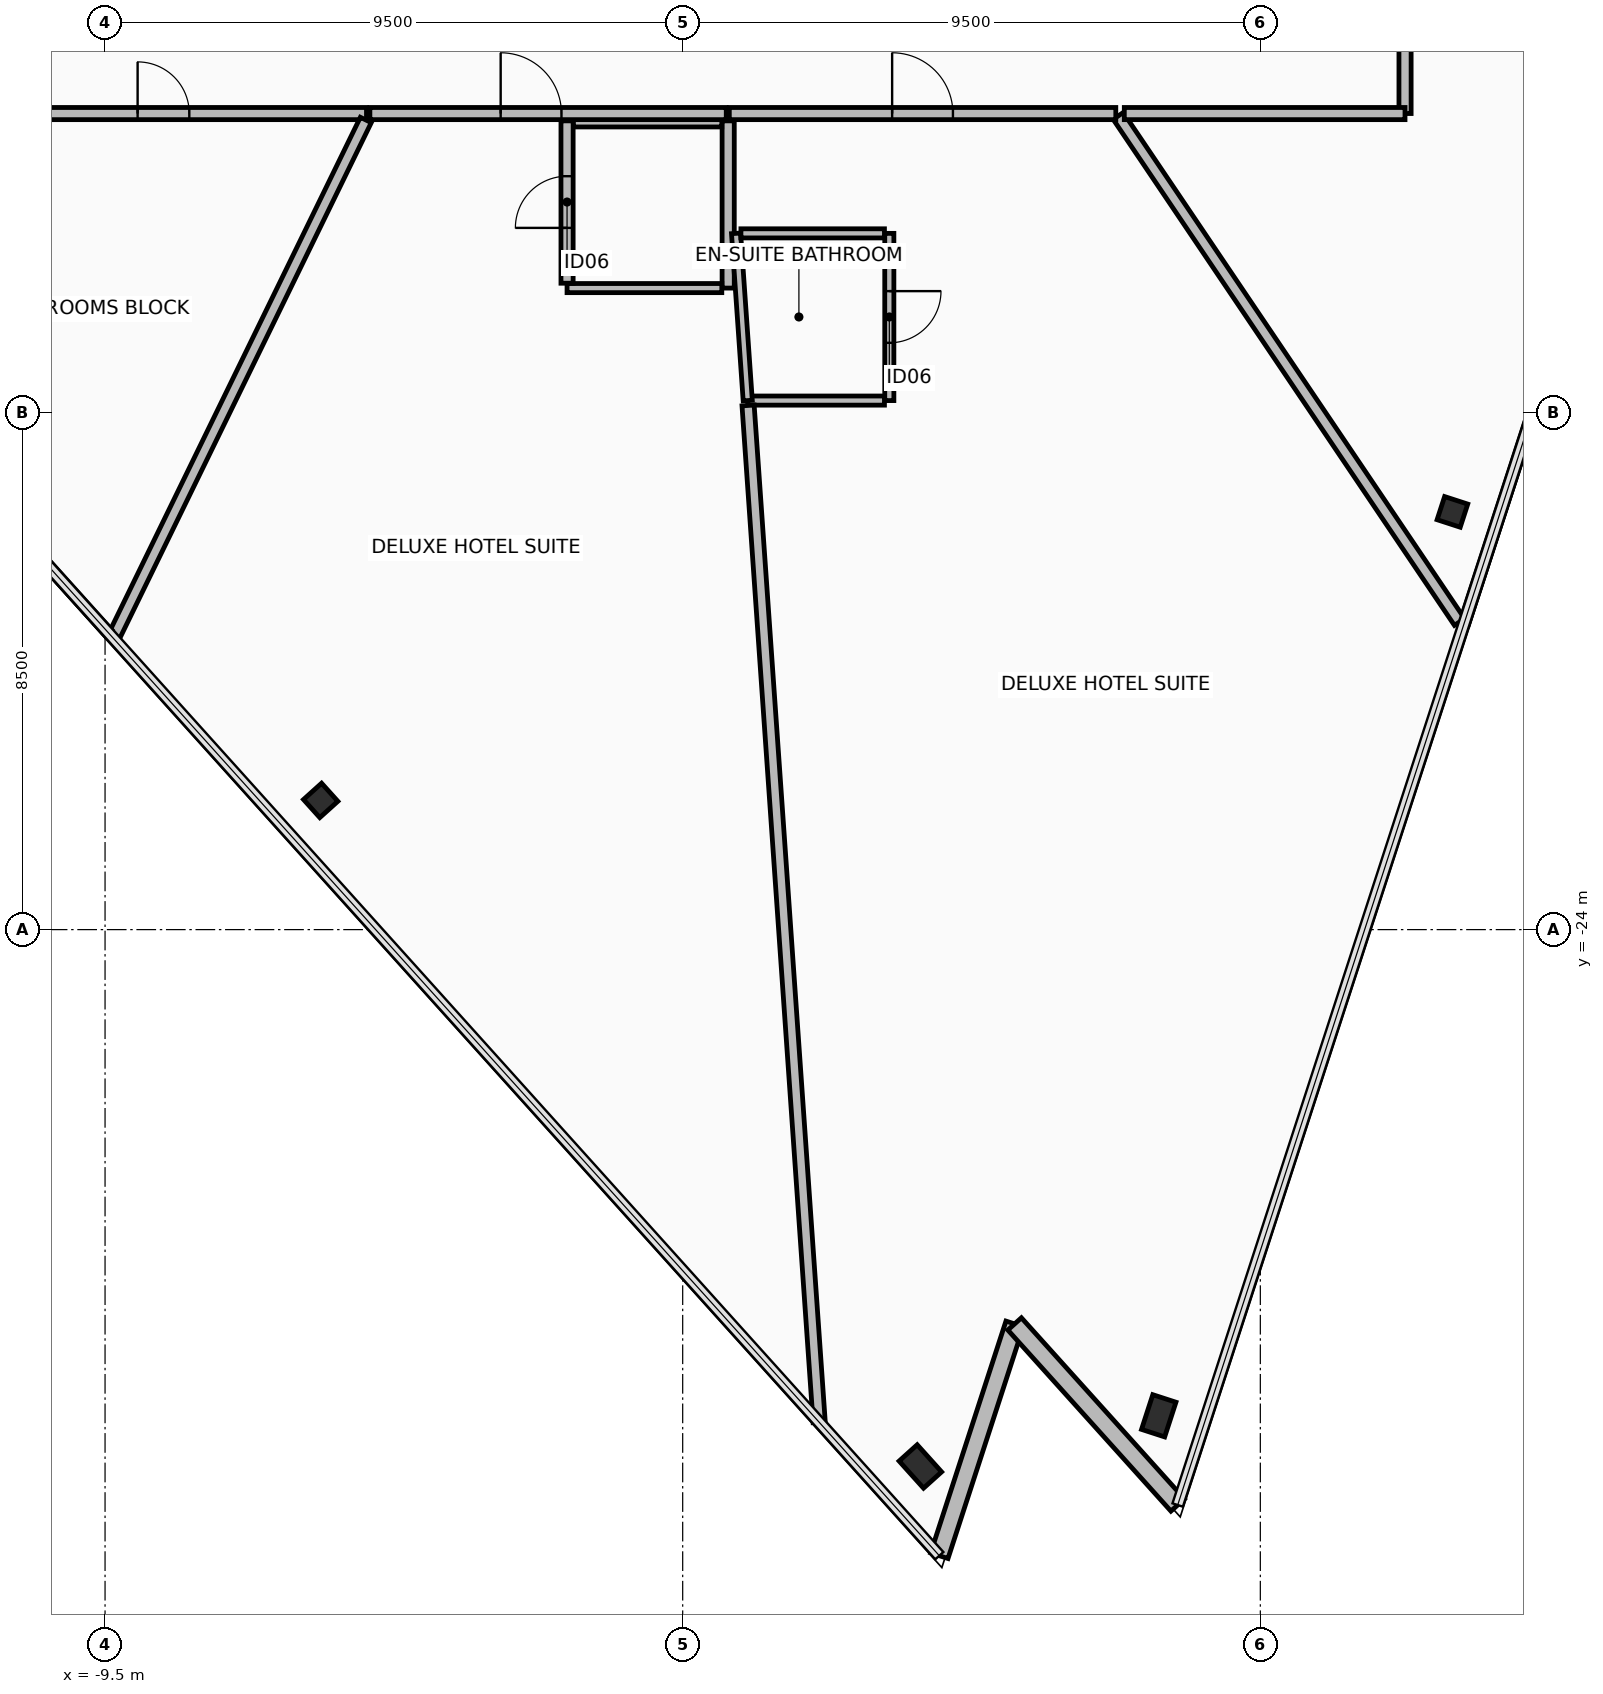
"""IFC4 building model, lengths in metres.
Left out: names, types, materials, properties, quantities, classifications, styles, units other than length and angle.
Written with IfcOpenShell. Run it as: python <this file> out.ifc"""

import sys

from ifc_helpers import new_model, si_unit, direction, frame, frame_2d, origin, origin_2d, place, context, subcontext, project, spatial, rectangle, hollow_rectangle, extrude, element, fill, save


model = new_model("IFC4")
c1 = context("Model", 3, precision=1e-05, world=origin(), true_north=direction((0.0, 1.0)))
c2 = subcontext(c1, "Body", "Model", "MODEL_VIEW")
j1 = project(units=[si_unit("LENGTHUNIT", "METRE"), si_unit("PLANEANGLEUNIT", "RADIAN")], contexts=[c1])
p1 = place(None, origin())
s1 = spatial("IfcSite", under=j1, at=p1, CompositionType="ELEMENT")
p2 = place(p1, origin())
s2 = spatial("IfcBuilding", under=s1, at=p2, CompositionType="ELEMENT")
p3 = place(p2, frame((0.0, 0.0, 279.75)))
s3 = spatial("IfcBuildingStorey", under=s2, at=p3, CompositionType="ELEMENT", Elevation=279.75)
p4 = place(p3, frame((-5.954, -21.875, 0.0), z_axis=(0.0, 0.0, 1.0), x_axis=(-0.669130606359, 0.743144825477, 0.0)))
e1 = element("IfcColumn", 1, at=p4, inside=s3, PredefinedType="COLUMN", context=c2, shape_type="SweptSolid", body=[
    extrude(hollow_rectangle(XDim=0.4, YDim=0.4, WallThickness=0.025, at=origin_2d()), origin(), (0.0, 0.0, 1.0), 3.65),
])
for number, where, z_axis, x_axis in (
    (2, (3.909, -32.829, 0.0), (0.0, 0.0, 1.0), (-0.669, 0.743, 0.0)),
    (3, (7.829, -31.996, 0.0), (0.0, 0.0, 1.0), (0.309, 0.951, 0.0)),
):
    element("IfcColumn", number, at=place(p3, frame(where, z_axis=z_axis, x_axis=x_axis)), inside=s3, PredefinedType="COLUMN", context=c2, shape_type="SweptSolid", body=[
        extrude(hollow_rectangle(XDim=0.4, YDim=0.6, WallThickness=0.03, at=origin_2d()), origin(), (0.0, 0.0, 1.0), 3.65),
    ])
p5 = place(p3, frame((12.659, -17.131, -0.19), z_axis=(0.0, 0.0, 1.0), x_axis=(0.309018654281, 0.951055976957, 0.0)))
e4 = element("IfcColumn", 4, at=p5, inside=s3, PredefinedType="COLUMN", context=c2, shape_type="SweptSolid", body=[
    extrude(hollow_rectangle(XDim=0.4, YDim=0.4, WallThickness=0.025, at=origin_2d()), origin(), (0.0, 0.0, 1.0), 3.84),
])
p6 = place(p3, frame((4.221, -34.296, 0.0), z_axis=(0.0, 0.0, 1.0), x_axis=(0.309018580232, 0.951056001018, 0.0)))
e5 = element("IfcWall", 5, at=p6, inside=s3, PredefinedType="STANDARD", context=c2, shape_type="SweptSolid", body=[
    extrude(rectangle(XDim=4.008, YDim=0.3, at=frame_2d((2.004, 0.0))), origin(), (0.0, 0.0, 1.0), 2.81),
])
p7 = place(p3, frame((5.459, -30.484, 0.0), z_axis=(0.0, 0.0, 1.0), x_axis=(0.669132983361, -0.743142685208, 0.0)))
e6 = element("IfcWall", 6, at=p7, inside=s3, PredefinedType="STANDARD", context=c2, shape_type="SweptSolid", body=[
    extrude(rectangle(XDim=4.008, YDim=0.3, at=frame_2d((2.004, 0.0))), origin(), (0.0, 0.0, 1.0), 2.81),
])
p8 = place(p3, frame((0.748, -10.7, 0.0), z_axis=(0.0, 0.0, 1.0), x_axis=(0.0, -1.0, 0.0)))
e7 = element("IfcWall", 7, at=p8, inside=s3, PredefinedType="PARTITIONING", context=c2, shape_type="SweptSolid", body=[
    extrude(rectangle(XDim=2.75, YDim=0.2, at=frame_2d((1.375, 0.0))), origin(), (0.0, 0.0, 1.0), 3.465),
])
p9 = place(p3, frame((0.643, -13.45, 0.0), z_axis=(0.0, 0.0, 1.0), x_axis=(-1.0, 0.0, 0.0)))
e8 = element("IfcWall", 8, at=p9, inside=s3, PredefinedType="PARTITIONING", context=c2, shape_type="SweptSolid", body=[
    extrude(rectangle(XDim=2.545, YDim=0.15, at=frame_2d((1.272, 0.0))), origin(), (0.0, 0.0, 1.0), 3.465),
])
p10 = place(p3, frame((-1.902, -13.37, 0.0), z_axis=(0.0, 0.0, 1.0), x_axis=(0.0, 1.0, 0.0)))
e9 = element("IfcWall", 9, at=p10, inside=s3, PredefinedType="PARTITIONING", context=c2, shape_type="SweptSolid", body=[
    extrude(rectangle(XDim=2.67, YDim=0.2, at=frame_2d((1.335, 0.0))), origin(), (0.0, 0.0, 1.0), 3.465),
])
p11 = place(p10, frame((0.91, 0.0, 0.0)))
e10 = element("IfcOpeningElement", 10, at=p11, cuts=e9, PredefinedType="OPENING", context=c2, shape_type="SweptSolid", body=[
    extrude(rectangle(XDim=0.85, YDim=2.1, at=frame_2d((0.425, 1.05))), frame((0.0, 0.11, 0.0), z_axis=(0.0, -1.0, 0.0), x_axis=(1.0, 0.0, 0.0)), (0.0, 0.0, 1.0), 0.22),
])
p12 = place(p3, frame((-1.797, -10.7, 0.0), z_axis=(0.0, 0.0, 1.0), x_axis=(1.0, 0.0, 0.0)))
e11 = element("IfcWall", 11, at=p12, inside=s3, PredefinedType="PARTITIONING", context=c2, shape_type="SweptSolid", body=[
    extrude(rectangle(XDim=2.44, YDim=0.2, at=frame_2d((1.22, 0.0))), origin(), (0.0, 0.0, 1.0), 3.465),
])
p13 = place(p3, frame((3.398, -12.55, 0.0), z_axis=(0.0, 0.0, 1.0), x_axis=(0.0, -1.0, 0.0)))
e12 = element("IfcWall", 12, at=p13, inside=s3, PredefinedType="PARTITIONING", context=c2, shape_type="SweptSolid", body=[
    extrude(rectangle(XDim=2.75, YDim=0.15, at=frame_2d((1.375, 0.0))), origin(), (0.0, 0.0, 1.0), 3.465),
])
p14 = place(p13, frame((0.95, 0.0, 0.0)))
e13 = element("IfcOpeningElement", 13, at=p14, cuts=e12, PredefinedType="OPENING", context=c2, shape_type="SweptSolid", body=[
    extrude(rectangle(XDim=0.85, YDim=2.1, at=frame_2d((0.425, 1.05))), frame((0.0, 0.085, 0.0), z_axis=(0.0, -1.0, 0.0), x_axis=(1.0, 0.0, 0.0)), (0.0, 0.0, 1.0), 0.17),
])
p15 = place(p3, frame((3.318, -15.3, 0.0), z_axis=(0.0, 0.0, 1.0), x_axis=(-1.0, 0.0, 0.0)))
e14 = element("IfcWall", 14, at=p15, inside=s3, PredefinedType="PARTITIONING", context=c2, shape_type="SweptSolid", body=[
    extrude(rectangle(XDim=2.248, YDim=0.15, at=frame_2d((1.124, 0.0))), origin(), (0.0, 0.0, 1.0), 3.465),
])
p16 = place(p3, frame((1.07, -15.3, 0.0), z_axis=(0.0, 0.0, 1.0), x_axis=(-0.069698693715, 0.997568088952, 0.0)))
e15 = element("IfcWall", 15, at=p16, inside=s3, PredefinedType="PARTITIONING", context=c2, shape_type="SweptSolid", body=[
    extrude(rectangle(XDim=2.757, YDim=0.15, at=frame_2d((1.378, 0.0))), origin(), (0.0, 0.0, 1.0), 3.465),
])
p17 = place(p3, frame((0.958, -12.55, 0.0), z_axis=(0.0, 0.0, 1.0), x_axis=(1.0, 0.0, 0.0)))
e16 = element("IfcWall", 16, at=p17, inside=s3, PredefinedType="PARTITIONING", context=c2, shape_type="SweptSolid", body=[
    extrude(rectangle(XDim=2.36, YDim=0.15, at=frame_2d((1.18, 0.0))), origin(), (0.0, 0.0, 1.0), 3.465),
])
p18 = place(p3, frame((-11.879, -10.58, 0.0), z_axis=(0.0, 0.0, 1.0), x_axis=(1.0, 0.0, 0.0)))
e17 = element("IfcWall", 17, at=p18, inside=s3, PredefinedType="PARTITIONING", context=c2, shape_type="SweptSolid", body=[
    extrude(rectangle(XDim=6.679, YDim=0.2, at=frame_2d((3.34, 0.0))), origin(), (0.0, 0.0, 1.0), 3.22),
])
p19 = place(p18, frame((2.915, 0.0, 0.0)))
e18 = element("IfcOpeningElement", 18, at=p19, cuts=e17, PredefinedType="OPENING", context=c2, shape_type="SweptSolid", body=[
    extrude(rectangle(XDim=0.85, YDim=2.1, at=frame_2d((0.425, 1.05))), frame((0.0, 0.11, 0.0), z_axis=(0.0, -1.0, 0.0), x_axis=(1.0, 0.0, 0.0)), (0.0, 0.0, 1.0), 0.22),
])
p20 = place(p3, frame((-5.211, -10.685, 0.0), z_axis=(0.0, 0.0, 1.0), x_axis=(-0.438373396373, -0.8987929491, 0.0)))
e19 = element("IfcWall", 19, at=p20, inside=s3, PredefinedType="PARTITIONING", context=c2, shape_type="SweptSolid", body=[
    extrude(rectangle(XDim=9.479, YDim=0.2, at=frame_2d((4.74, 0.0))), origin(), (0.0, 0.0, 1.0), 2.81),
])
p21 = place(p3, frame((-9.443, -19.121, 0.0), z_axis=(0.0, 0.0, 1.0), x_axis=(-0.669126879752, 0.743148180912, 0.0)))
e20 = element("IfcWall", 20, at=p21, inside=s3, PredefinedType="PARTITIONING", context=c2, shape_type="SweptSolid", body=[
    extrude(rectangle(XDim=10.647, YDim=0.15, at=frame_2d((5.323, 0.0))), origin(), (0.0, 0.0, 1.0), 3.465),
])
p22 = place(p3, frame((11.88, -10.579, 0.0), z_axis=(0.0, 0.0, 1.0), x_axis=(0.0, 1.0, 0.0)))
e21 = element("IfcWall", 21, at=p22, inside=s3, PredefinedType="PARTITIONING", context=c2, shape_type="SweptSolid", body=[
    extrude(rectangle(XDim=4.745, YDim=0.2, at=frame_2d((2.373, 0.0))), origin(), (0.0, 0.0, 1.0), 2.96),
])
p23 = place(p22, frame((1.948, 0.0, 0.0)))
e22 = element("IfcOpeningElement", 22, at=p23, cuts=e21, PredefinedType="OPENING", context=c2, shape_type="SweptSolid", body=[
    extrude(rectangle(XDim=0.85, YDim=2.1, at=frame_2d((0.425, 1.05))), frame((0.0, 0.11, 0.0), z_axis=(0.0, -1.0, 0.0), x_axis=(1.0, 0.0, 0.0)), (0.0, 0.0, 1.0), 0.22),
])
p24 = place(p3, frame((16.406, -8.026, 0.0), z_axis=(0.0, 0.0, 1.0), x_axis=(-0.309030454155, -0.951052142842, 0.0)))
e23 = element("IfcWall", 23, at=p24, inside=s3, PredefinedType="PARTITIONING", context=c2, shape_type="SweptSolid", body=[
    extrude(rectangle(XDim=11.514, YDim=0.15, at=frame_2d((5.757, 0.0))), origin(), (0.0, 0.0, 1.0), 3.465),
])
p25 = place(p3, frame((12.776, -18.941, 0.0), z_axis=(0.0, 0.0, 1.0), x_axis=(-0.559187933526, 0.829040924804, 0.0)))
e24 = element("IfcWall", 24, at=p25, inside=s3, PredefinedType="PARTITIONING", context=c2, shape_type="SweptSolid", body=[
    extrude(rectangle(XDim=10.038, YDim=0.2, at=frame_2d((5.019, 0.0))), origin(), (0.0, 0.0, 1.0), 2.81),
])
p26 = place(p3, frame((7.263, -10.58, 0.0), z_axis=(0.0, 0.0, 1.0), x_axis=(1.0, 0.0, 0.0)))
e25 = element("IfcWall", 25, at=p26, inside=s3, PredefinedType="PARTITIONING", context=c2, shape_type="SweptSolid", body=[
    extrude(rectangle(XDim=4.616, YDim=0.2, at=frame_2d((2.308, 0.0))), origin(), (0.0, 0.0, 1.0), 2.96),
])
p27 = place(p3, frame((-5.145, -10.58, 0.0), z_axis=(0.0, 0.0, 1.0), x_axis=(1.0, 0.0, 0.0)))
e26 = element("IfcWall", 26, at=p27, inside=s3, PredefinedType="PARTITIONING", context=c2, shape_type="SweptSolid", body=[
    extrude(rectangle(XDim=5.861, YDim=0.2, at=frame_2d((2.931, 0.0))), origin(), (0.0, 0.0, 1.0), 2.96),
])
p28 = place(p27, frame((2.151, 0.0, 0.0)))
e27 = element("IfcOpeningElement", 27, at=p28, cuts=e26, PredefinedType="OPENING", context=c2, shape_type="SweptSolid", body=[
    extrude(rectangle(XDim=1.0, YDim=2.15, at=frame_2d((0.5, 1.075))), frame((0.0, 0.11, 0.0), z_axis=(0.0, -1.0, 0.0), x_axis=(1.0, 0.0, 0.0)), (0.0, 0.0, 1.0), 0.22),
])
p29 = place(p3, frame((1.075, -15.38, 0.0), z_axis=(0.0, 0.0, 1.0), x_axis=(0.069765789378, -0.997563398804, 0.0)))
e28 = element("IfcWall", 28, at=p29, inside=s3, PredefinedType="PARTITIONING", context=c2, shape_type="SweptSolid", body=[
    extrude(rectangle(XDim=16.762, YDim=0.2, at=frame_2d((8.381, 0.0))), origin(), (0.0, 0.0, 1.0), 2.81),
])
p30 = place(p3, frame((0.767, -10.58, 0.0), z_axis=(0.0, 0.0, 1.0), x_axis=(1.0, 0.0, 0.0)))
e29 = element("IfcWall", 29, at=p30, inside=s3, PredefinedType="PARTITIONING", context=c2, shape_type="SweptSolid", body=[
    extrude(rectangle(XDim=6.356, YDim=0.2, at=frame_2d((3.178, 0.0))), origin(), (0.0, 0.0, 1.0), 3.465),
])
p31 = place(p30, frame((2.678, 0.0, 0.0)))
e30 = element("IfcOpeningElement", 30, at=p31, cuts=e29, PredefinedType="OPENING", context=c2, shape_type="SweptSolid", body=[
    extrude(rectangle(XDim=1.0, YDim=2.15, at=frame_2d((0.5, 1.075))), frame((0.0, 0.11, 0.0), z_axis=(0.0, -1.0, 0.0), x_axis=(1.0, 0.0, 0.0)), (0.0, 0.0, 1.0), 0.22),
])
p32 = place(p11, origin())
e31 = element("IfcDoor", 31, at=p32, inside=s3, OperationType="SINGLE_SWING_RIGHT", PredefinedType="DOOR", context=c2, shape_type="SweptSolid", body=[
    extrude(rectangle(XDim=0.85, YDim=2.1, at=frame_2d((0.425, 1.05))), frame((0.0, 0.025, 0.0), z_axis=(0.0, -1.0, 0.0), x_axis=(1.0, 0.0, 0.0)), (0.0, 0.0, 1.0), 0.05),
])
fill(e10, e31)
p33 = place(p14, origin())
e32 = element("IfcDoor", 32, at=p33, inside=s3, OperationType="SINGLE_SWING_RIGHT", PredefinedType="DOOR", context=c2, shape_type="SweptSolid", body=[
    extrude(rectangle(XDim=0.85, YDim=2.1, at=frame_2d((0.425, 1.05))), frame((0.0, 0.025, 0.0), z_axis=(0.0, -1.0, 0.0), x_axis=(1.0, 0.0, 0.0)), (0.0, 0.0, 1.0), 0.05),
])
fill(e13, e32)
p34 = place(p19, origin())
e33 = element("IfcDoor", 33, at=p34, inside=s3, OperationType="SINGLE_SWING_RIGHT", PredefinedType="DOOR", context=c2, shape_type="SweptSolid", body=[
    extrude(rectangle(XDim=0.85, YDim=2.1, at=frame_2d((0.425, 1.05))), frame((0.0, 0.025, 0.0), z_axis=(0.0, -1.0, 0.0), x_axis=(1.0, 0.0, 0.0)), (0.0, 0.0, 1.0), 0.05),
])
fill(e18, e33)
p35 = place(p28, origin())
e34 = element("IfcDoor", 34, at=p35, inside=s3, OperationType="SINGLE_SWING_LEFT", PredefinedType="DOOR", context=c2, shape_type="SweptSolid", body=[
    extrude(rectangle(XDim=1.0, YDim=2.15, at=frame_2d((0.5, 1.075))), frame((0.0, 0.025, 0.0), z_axis=(0.0, -1.0, 0.0), x_axis=(1.0, 0.0, 0.0)), (0.0, 0.0, 1.0), 0.05),
])
fill(e27, e34)
p36 = place(p31, origin())
e35 = element("IfcDoor", 35, at=p36, inside=s3, OperationType="SINGLE_SWING_LEFT", PredefinedType="DOOR", context=c2, shape_type="SweptSolid", body=[
    extrude(rectangle(XDim=1.0, YDim=2.15, at=frame_2d((0.5, 1.075))), frame((0.0, 0.025, 0.0), z_axis=(0.0, -1.0, 0.0), x_axis=(1.0, 0.0, 0.0)), (0.0, 0.0, 1.0), 0.05),
])
fill(e30, e35)
save(model, sys.argv[1])
